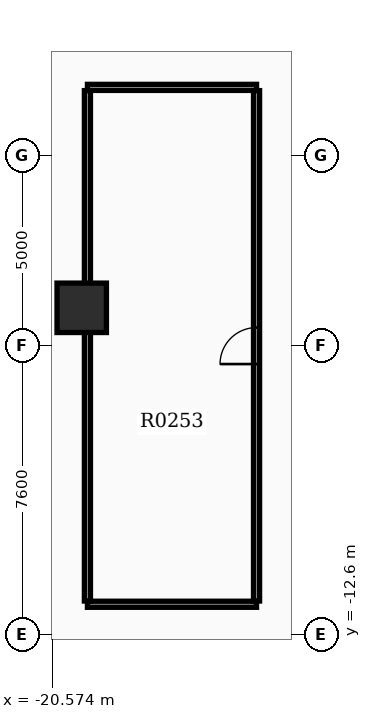
"""IFC4 building model, lengths in metres.
Left out: names, types, materials, properties, quantities, classifications, styles, units other than length and angle.
Written with IfcOpenShell. Run it as: python <this file> out.ifc"""

import sys

from ifc_helpers import new_model, si_unit, direction, frame, frame_2d, origin, origin_2d, place, context, subcontext, project, spatial, rectangle, extrude, element, fill, save


model = new_model("IFC4")
c1 = context("Model", 3, precision=1e-05, world=origin(), true_north=direction((0.0, 1.0)))
c2 = subcontext(c1, "Body", "Model", "MODEL_VIEW")
j1 = project(units=[si_unit("LENGTHUNIT", "METRE"), si_unit("PLANEANGLEUNIT", "RADIAN")], contexts=[c1])
p1 = place(None, origin())
s1 = spatial("IfcSite", under=j1, at=p1, CompositionType="ELEMENT")
p2 = place(p1, origin())
s2 = spatial("IfcBuilding", under=s1, at=p2, CompositionType="ELEMENT")
p3 = place(p2, frame((0.0, 0.0, 19.2)))
s3 = spatial("IfcBuildingStorey", under=s2, at=p3, CompositionType="ELEMENT", Elevation=19.2)
p4 = place(p3, frame((-19.8, -4.0, 0.0), z_axis=(0.0, 0.0, 1.0), x_axis=(1.0, 0.0, 0.0)))
e1 = element("IfcColumn", 1, at=p4, inside=s3, PredefinedType="COLUMN", context=c2, shape_type="SweptSolid", body=[
    extrude(rectangle(XDim=1.3, YDim=1.3, at=origin_2d()), origin(), (0.0, 0.0, 1.0), 4.5),
])
for number, where, z_axis, x_axis in (
    (2, (-19.65, -11.8, 0.0), (0.0, 0.0, 1.0), (1.0, 0.0, 0.0)),
    (3, (-19.65, 1.8, 0.0), (0.0, 0.0, 1.0), (1.0, 0.0, 0.0)),
):
    element("IfcWall", number, at=place(p3, frame(where, z_axis=z_axis, x_axis=x_axis)), inside=s3, PredefinedType="PARTITIONING", context=c2, shape_type="SweptSolid", body=[
        extrude(rectangle(XDim=4.45, YDim=0.16, at=frame_2d((2.225, 0.0))), origin(), (0.0, 0.0, 1.0), 3.37),
    ])
p5 = place(p3, frame((-19.65, -11.715, 0.0), z_axis=(0.0, 0.0, 1.0), x_axis=(0.0, 1.0, 0.0)))
e4 = element("IfcWall", 4, at=p5, inside=s3, PredefinedType="PARTITIONING", context=c2, shape_type="SweptSolid", body=[
    extrude(rectangle(XDim=13.43, YDim=0.16, at=frame_2d((6.715, 0.0))), origin(), (0.0, 0.0, 1.0), 3.37),
])
p6 = place(p3, frame((-15.2, -11.715, 0.0), z_axis=(0.0, 0.0, 1.0), x_axis=(0.0, 1.0, 0.0)))
e5 = element("IfcWall", 5, at=p6, inside=s3, PredefinedType="PARTITIONING", context=c2, shape_type="SweptSolid", body=[
    extrude(rectangle(XDim=13.43, YDim=0.16, at=frame_2d((6.715, 0.0))), origin(), (0.0, 0.0, 1.0), 3.37),
])
p7 = place(p6, frame((6.235, 0.0, 0.0)))
e6 = element("IfcOpeningElement", 6, at=p7, cuts=e5, PredefinedType="OPENING", context=c2, shape_type="SweptSolid", body=[
    extrude(rectangle(XDim=0.96, YDim=2.15, at=frame_2d((0.48, 1.075))), frame((0.0, 0.09, 0.0), z_axis=(0.0, -1.0, 0.0), x_axis=(1.0, 0.0, 0.0)), (0.0, 0.0, 1.0), 0.18),
])
p8 = place(p7, origin())
e7 = element("IfcDoor", 7, at=p8, inside=s3, OperationType="SINGLE_SWING_LEFT", PredefinedType="DOOR", context=c2, shape_type="SweptSolid", body=[
    extrude(rectangle(XDim=0.96, YDim=2.15, at=frame_2d((0.48, 1.075))), frame((0.0, 0.025, 0.0), z_axis=(0.0, -1.0, 0.0), x_axis=(1.0, 0.0, 0.0)), (0.0, 0.0, 1.0), 0.05),
])
fill(e6, e7)
save(model, sys.argv[1])
